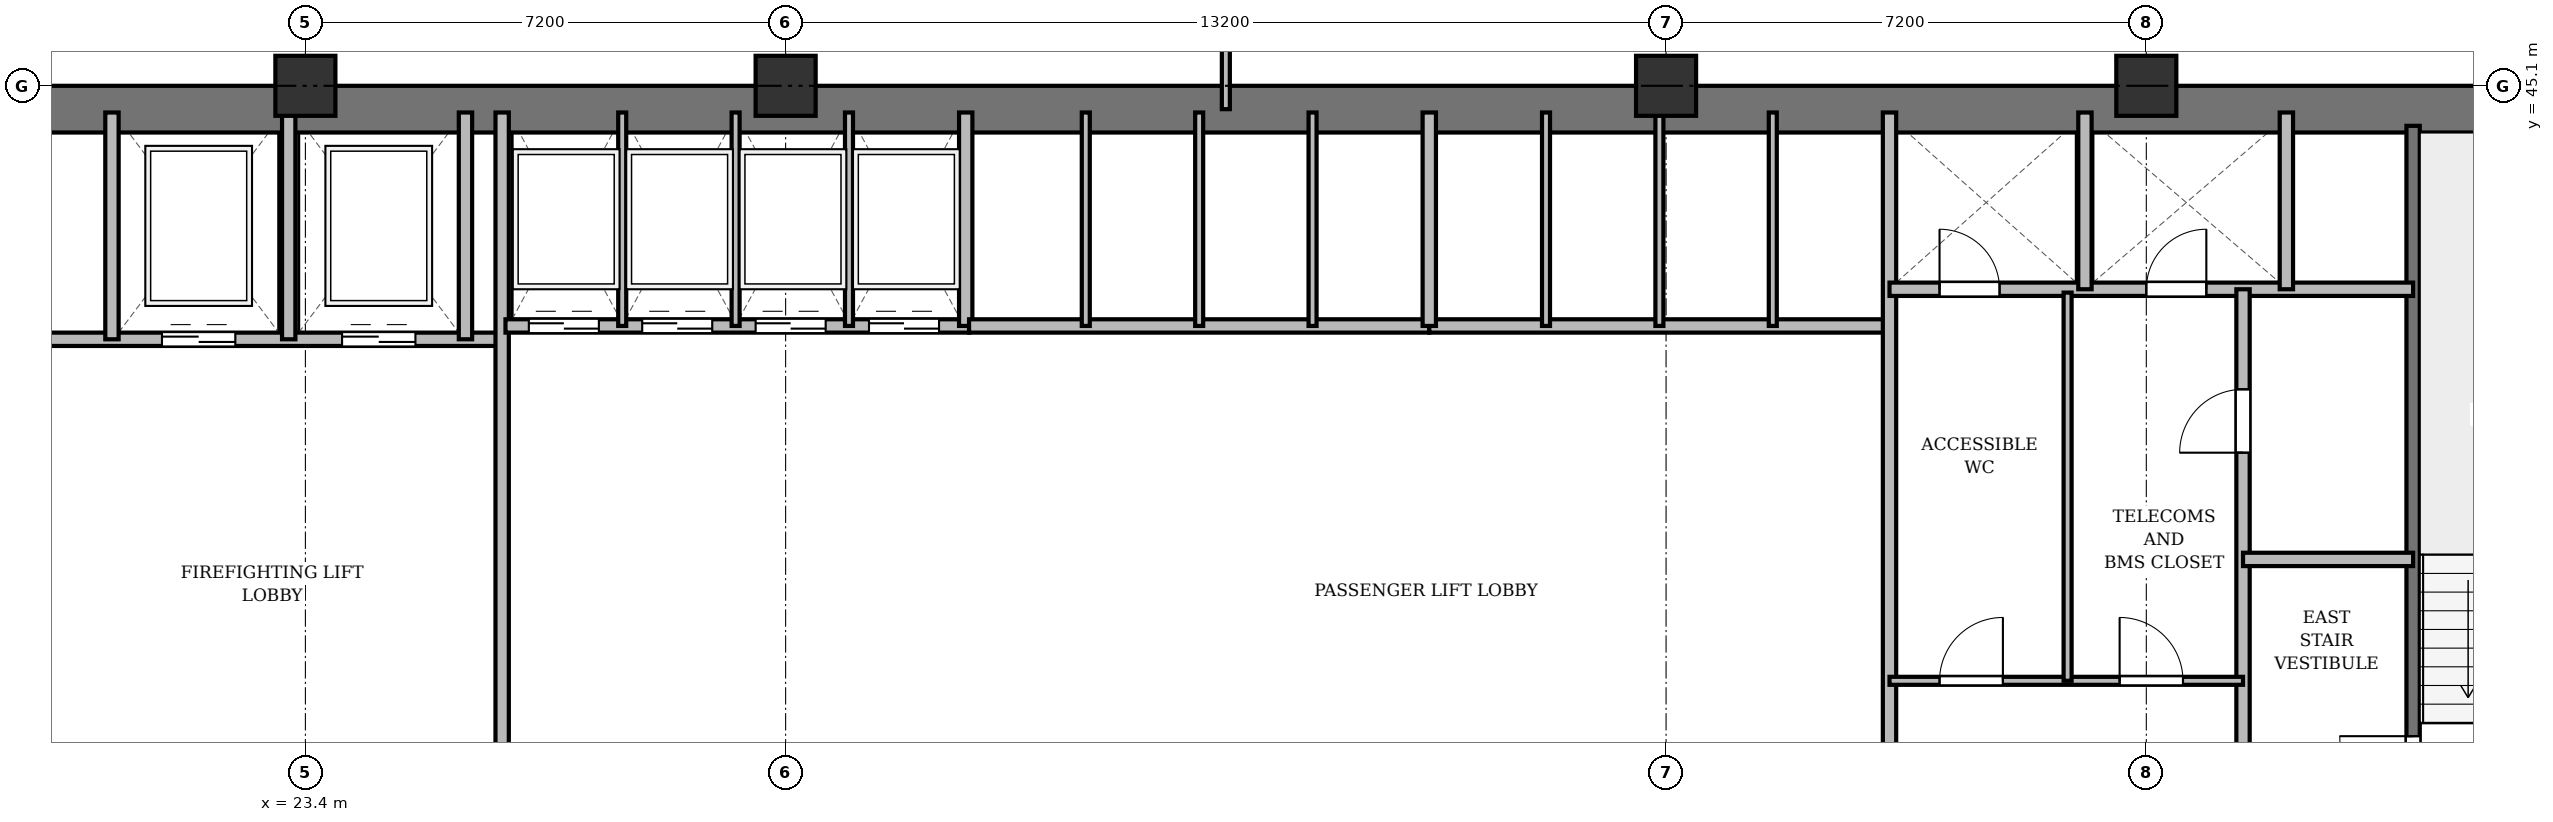
"""IFC4 building model, lengths in metres.
Left out: names, types, materials, properties, quantities, classifications, styles, units other than length and angle.
Written with IfcOpenShell. Run it as: python <this file> out.ifc"""

import sys

from ifc_helpers import new_model, si_unit, direction, frame, frame_2d, origin, origin_2d, place, context, subcontext, project, spatial, rectangle, extrude, source, transform, mapped, element, fill, save


model = new_model("IFC4")
c1 = context("Model", 3, precision=1e-05, world=origin(), true_north=direction((0.0, 1.0)))
c2 = subcontext(c1, "Body", "Model", "MODEL_VIEW")
j1 = project(units=[si_unit("LENGTHUNIT", "METRE"), si_unit("PLANEANGLEUNIT", "RADIAN")], contexts=[c1])
p1 = place(None, origin())
s1 = spatial("IfcSite", under=j1, at=p1, CompositionType="ELEMENT")
p2 = place(p1, origin())
s2 = spatial("IfcBuilding", under=s1, at=p2, CompositionType="ELEMENT")
p3 = place(p2, frame((0.0, 0.0, 48.7)))
s3 = spatial("IfcBuildingStorey", under=s2, at=p3, CompositionType="ELEMENT", Elevation=48.7)
m1 = source(origin(), c2, "Body", "SweptSolid", [
    extrude(rectangle(XDim=0.9, YDim=0.9, at=origin_2d()), origin(), (0.0, 0.0, 1.0), 3.6),
])
for number, where, z_axis, x_axis in (
    (1, (23.4, 45.1, 0.0), (0.0, 0.0, 1.0), (1.0, 0.0, 0.0)),
    (2, (30.6, 45.1, 0.0), (0.0, 0.0, 1.0), (1.0, 0.0, 0.0)),
    (3, (43.8, 45.1, 0.0), (0.0, 0.0, 1.0), (1.0, 0.0, 0.0)),
    (4, (51.0, 45.1, 0.0), (0.0, 0.0, 1.0), (1.0, 0.0, 0.0)),
):
    element("IfcColumn", number, at=place(p3, frame(where, z_axis=z_axis, x_axis=x_axis)), inside=s3, PredefinedType="COLUMN", context=c2, shape_type="MappedRepresentation", body=[
        mapped(m1, transform((0.0, 0.0, 0.0), x_axis=(1.0, 0.0, 0.0), y_axis=(0.0, 1.0, 0.0), z_axis=(0.0, 0.0, 1.0), scale=1.0)),
    ])
p4 = place(p3, frame((15.5, 44.75, 0.0), z_axis=(0.0, 0.0, 1.0), x_axis=(1.0, 0.0, 0.0)))
e5 = element("IfcWall", 5, at=p4, inside=s3, PredefinedType="SHEAR", context=c2, shape_type="SweptSolid", body=[
    extrude(rectangle(XDim=43.4, YDim=0.7, at=frame_2d((21.7, 0.0))), origin(), (0.0, 0.0, 1.0), 3.34),
])
p5 = place(p3, frame((55.0, 33.4, 0.0), z_axis=(0.0, 0.0, 1.0), x_axis=(0.0, 1.0, 0.0)))
e6 = element("IfcWall", 6, at=p5, inside=s3, PredefinedType="SHEAR", context=c2, shape_type="SweptSolid", body=[
    extrude(rectangle(XDim=11.1, YDim=0.2, at=frame_2d((5.55, 0.0))), origin(), (0.0, 0.0, 1.0), 3.34),
])
p6 = place(p5, frame((0.85, 0.0, 0.0)))
e7 = element("IfcOpeningElement", 7, at=p6, cuts=e6, PredefinedType="OPENING", context=c2, shape_type="SweptSolid", body=[
    extrude(rectangle(XDim=1.1, YDim=2.15, at=frame_2d((0.55, 1.075))), frame((0.0, 0.11, 0.0), z_axis=(0.0, -1.0, 0.0), x_axis=(1.0, 0.0, 0.0)), (0.0, 0.0, 1.0), 0.22),
])
p7 = place(p3, frame((19.55, 41.3, 0.0), z_axis=(0.0, 0.0, 1.0), x_axis=(1.0, 0.0, 0.0)))
e8 = element("IfcWall", 8, at=p7, inside=s3, PredefinedType="SOLIDWALL", context=c2, shape_type="SweptSolid", body=[
    extrude(rectangle(XDim=6.75, YDim=0.2, at=frame_2d((3.375, 0.0))), origin(), (0.0, 0.0, 1.0), 3.34),
])
p8 = place(p7, frame((1.7, 0.0, 0.0)))
e9 = element("IfcOpeningElement", 9, at=p8, cuts=e8, PredefinedType="OPENING", context=c2, shape_type="SweptSolid", body=[
    extrude(rectangle(XDim=1.1, YDim=2.15, at=frame_2d((0.55, 1.075))), frame((0.0, 0.11, 0.0), z_axis=(0.0, -1.0, 0.0), x_axis=(1.0, 0.0, 0.0)), (0.0, 0.0, 1.0), 0.22),
])
p9 = place(p7, frame((4.4, 0.0, 0.0)))
e10 = element("IfcOpeningElement", 10, at=p9, cuts=e8, PredefinedType="OPENING", context=c2, shape_type="SweptSolid", body=[
    extrude(rectangle(XDim=1.1, YDim=2.15, at=frame_2d((0.55, 1.075))), frame((0.0, 0.11, 0.0), z_axis=(0.0, -1.0, 0.0), x_axis=(1.0, 0.0, 0.0)), (0.0, 0.0, 1.0), 0.22),
])
for number, where, z_axis, x_axis in (
    (11, (20.5, 41.3, 0.0), (0.0, 0.0, 1.0), (0.0, 1.0, 0.0)),
    (12, (23.15, 41.3, 0.0), (0.0, 0.0, 1.0), (0.0, 1.0, 0.0)),
    (13, (25.8, 41.3, 0.0), (0.0, 0.0, 1.0), (0.0, 1.0, 0.0)),
):
    element("IfcWall", number, at=place(p3, frame(where, z_axis=z_axis, x_axis=x_axis)), inside=s3, PredefinedType="SOLIDWALL", context=c2, shape_type="SweptSolid", body=[
        extrude(rectangle(XDim=3.4, YDim=0.2, at=frame_2d((1.7, 0.0))), origin(), (0.0, 0.0, 1.0), 3.34),
    ])
p10 = place(p3, frame((26.35, 33.4, 0.0), z_axis=(0.0, 0.0, 1.0), x_axis=(0.0, 1.0, 0.0)))
e14 = element("IfcWall", 14, at=p10, inside=s3, PredefinedType="SOLIDWALL", context=c2, shape_type="SweptSolid", body=[
    extrude(rectangle(XDim=11.3, YDim=0.2, at=frame_2d((5.65, 0.0))), origin(), (0.0, 0.0, 1.0), 2.69),
])
p11 = place(p3, frame((26.4, 41.5, 0.0), z_axis=(0.0, 0.0, 1.0), x_axis=(1.0, 0.0, 0.0)))
e15 = element("IfcWall", 15, at=p11, inside=s3, PredefinedType="SOLIDWALL", context=c2, shape_type="SweptSolid", body=[
    extrude(rectangle(XDim=6.95, YDim=0.2, at=frame_2d((3.475, 0.0))), origin(), (0.0, 0.0, 1.0), 3.34),
])
p12 = place(p11, frame((0.35, 0.0, 0.0)))
e16 = element("IfcOpeningElement", 16, at=p12, cuts=e15, PredefinedType="OPENING", context=c2, shape_type="SweptSolid", body=[
    extrude(rectangle(XDim=1.05, YDim=2.15, at=frame_2d((0.525, 1.075))), frame((0.0, 0.11, 0.0), z_axis=(0.0, -1.0, 0.0), x_axis=(1.0, 0.0, 0.0)), (0.0, 0.0, 1.0), 0.22),
])
p13 = place(p11, frame((2.05, 0.0, 0.0)))
e17 = element("IfcOpeningElement", 17, at=p13, cuts=e15, PredefinedType="OPENING", context=c2, shape_type="SweptSolid", body=[
    extrude(rectangle(XDim=1.05, YDim=2.15, at=frame_2d((0.525, 1.075))), frame((0.0, 0.11, 0.0), z_axis=(0.0, -1.0, 0.0), x_axis=(1.0, 0.0, 0.0)), (0.0, 0.0, 1.0), 0.22),
])
p14 = place(p11, frame((3.75, 0.0, 0.0)))
e18 = element("IfcOpeningElement", 18, at=p14, cuts=e15, PredefinedType="OPENING", context=c2, shape_type="SweptSolid", body=[
    extrude(rectangle(XDim=1.05, YDim=2.15, at=frame_2d((0.525, 1.075))), frame((0.0, 0.11, 0.0), z_axis=(0.0, -1.0, 0.0), x_axis=(1.0, 0.0, 0.0)), (0.0, 0.0, 1.0), 0.22),
])
p15 = place(p11, frame((5.45, 0.0, 0.0)))
e19 = element("IfcOpeningElement", 19, at=p15, cuts=e15, PredefinedType="OPENING", context=c2, shape_type="SweptSolid", body=[
    extrude(rectangle(XDim=1.05, YDim=2.15, at=frame_2d((0.525, 1.075))), frame((0.0, 0.11, 0.0), z_axis=(0.0, -1.0, 0.0), x_axis=(1.0, 0.0, 0.0)), (0.0, 0.0, 1.0), 0.22),
])
p16 = place(p3, frame((33.3, 41.5, 0.0), z_axis=(0.0, 0.0, 1.0), x_axis=(0.0, 1.0, 0.0)))
e20 = element("IfcWall", 20, at=p16, inside=s3, PredefinedType="SOLIDWALL", context=c2, shape_type="SweptSolid", body=[
    extrude(rectangle(XDim=3.2, YDim=0.2, at=frame_2d((1.6, 0.0))), origin(), (0.0, 0.0, 1.0), 3.34),
])
for number, where, z_axis, x_axis in (
    (21, (28.15, 41.5, 0.0), (0.0, 0.0, 1.0), (0.0, 1.0, 0.0)),
    (22, (29.85, 41.5, 0.0), (0.0, 0.0, 1.0), (0.0, 1.0, 0.0)),
    (23, (31.55, 41.5, 0.0), (0.0, 0.0, 1.0), (0.0, 1.0, 0.0)),
):
    element("IfcWall", number, at=place(p3, frame(where, z_axis=z_axis, x_axis=x_axis)), inside=s3, PredefinedType="PARTITIONING", context=c2, shape_type="SweptSolid", body=[
        extrude(rectangle(XDim=3.2, YDim=0.12, at=frame_2d((1.6, 0.0))), origin(), (0.0, 0.0, 1.0), 3.34),
    ])
p17 = place(p3, frame((33.35, 41.5, 0.0), z_axis=(0.0, 0.0, 1.0), x_axis=(1.0, 0.0, 0.0)))
e24 = element("IfcWall", 24, at=p17, inside=s3, PredefinedType="SOLIDWALL", context=c2, shape_type="SweptSolid", body=[
    extrude(rectangle(XDim=6.9, YDim=0.2, at=frame_2d((3.45, 0.0))), origin(), (0.0, 0.0, 1.0), 3.34),
])
for number, where, z_axis, x_axis in (
    (25, (35.1, 41.5, 0.0), (0.0, 0.0, 1.0), (0.0, 1.0, 0.0)),
    (26, (36.8, 41.5, 0.0), (0.0, 0.0, 1.0), (0.0, 1.0, 0.0)),
    (27, (38.5, 41.5, 0.0), (0.0, 0.0, 1.0), (0.0, 1.0, 0.0)),
):
    element("IfcWall", number, at=place(p3, frame(where, z_axis=z_axis, x_axis=x_axis)), inside=s3, PredefinedType="PARTITIONING", context=c2, shape_type="SweptSolid", body=[
        extrude(rectangle(XDim=3.2, YDim=0.12, at=frame_2d((1.6, 0.0))), origin(), (0.0, 0.0, 1.0), 3.34),
    ])
p18 = place(p3, frame((40.25, 41.5, 0.0), z_axis=(0.0, 0.0, 1.0), x_axis=(1.0, 0.0, 0.0)))
e28 = element("IfcWall", 28, at=p18, inside=s3, PredefinedType="SOLIDWALL", context=c2, shape_type="SweptSolid", body=[
    extrude(rectangle(XDim=6.9, YDim=0.2, at=frame_2d((3.45, 0.0))), origin(), (0.0, 0.0, 1.0), 2.752),
])
p19 = place(p3, frame((40.25, 41.5, 0.0), z_axis=(0.0, 0.0, 1.0), x_axis=(0.0, 1.0, 0.0)))
e29 = element("IfcWall", 29, at=p19, inside=s3, PredefinedType="SOLIDWALL", context=c2, shape_type="SweptSolid", body=[
    extrude(rectangle(XDim=3.2, YDim=0.2, at=frame_2d((1.6, 0.0))), origin(), (0.0, 0.0, 1.0), 3.34),
])
p20 = place(p3, frame((42.0, 41.5, 0.0), z_axis=(0.0, 0.0, 1.0), x_axis=(0.0, 1.0, 0.0)))
e30 = element("IfcWall", 30, at=p20, inside=s3, PredefinedType="PARTITIONING", context=c2, shape_type="SweptSolid", body=[
    extrude(rectangle(XDim=3.2, YDim=0.12, at=frame_2d((1.6, 0.0))), origin(), (0.0, 0.0, 1.0), 3.34),
])
p21 = place(p3, frame((43.7, 41.5, 0.0), z_axis=(0.0, 0.0, 1.0), x_axis=(0.0, 1.0, 0.0)))
e31 = element("IfcWall", 31, at=p21, inside=s3, PredefinedType="PARTITIONING", context=c2, shape_type="SweptSolid", body=[
    extrude(rectangle(XDim=3.2, YDim=0.12, at=frame_2d((1.6, 0.0))), origin(), (0.0, 0.0, 1.0), 2.752),
])
p22 = place(p3, frame((45.4, 41.5, 0.0), z_axis=(0.0, 0.0, 1.0), x_axis=(0.0, 1.0, 0.0)))
e32 = element("IfcWall", 32, at=p22, inside=s3, PredefinedType="PARTITIONING", context=c2, shape_type="SweptSolid", body=[
    extrude(rectangle(XDim=3.2, YDim=0.12, at=frame_2d((1.6, 0.0))), origin(), (0.0, 0.0, 1.0), 3.34),
])
p23 = place(p3, frame((47.15, 33.4, 0.0), z_axis=(0.0, 0.0, 1.0), x_axis=(0.0, 1.0, 0.0)))
e33 = element("IfcWall", 33, at=p23, inside=s3, PredefinedType="SOLIDWALL", context=c2, shape_type="SweptSolid", body=[
    extrude(rectangle(XDim=11.3, YDim=0.2, at=frame_2d((5.65, 0.0))), origin(), (0.0, 0.0, 1.0), 2.69),
])
p24 = place(p3, frame((47.15, 42.05, 0.0), z_axis=(0.0, 0.0, 1.0), x_axis=(1.0, 0.0, 0.0)))
e34 = element("IfcWall", 34, at=p24, inside=s3, PredefinedType="SOLIDWALL", context=c2, shape_type="SweptSolid", body=[
    extrude(rectangle(XDim=7.85, YDim=0.2, at=frame_2d((3.925, 0.0))), origin(), (0.0, 0.0, 1.0), 2.752),
])
p25 = place(p24, frame((0.75, 0.0, 0.0)))
e35 = element("IfcOpeningElement", 35, at=p25, cuts=e34, PredefinedType="OPENING", context=c2, shape_type="SweptSolid", body=[
    extrude(rectangle(XDim=0.9, YDim=2.1, at=frame_2d((0.45, 1.05))), frame((0.0, 0.11, 0.0), z_axis=(0.0, -1.0, 0.0), x_axis=(1.0, 0.0, 0.0)), (0.0, 0.0, 1.0), 0.22),
])
p26 = place(p24, frame((3.85, 0.0, 0.0)))
e36 = element("IfcOpeningElement", 36, at=p26, cuts=e34, PredefinedType="OPENING", context=c2, shape_type="SweptSolid", body=[
    extrude(rectangle(XDim=0.9, YDim=2.1, at=frame_2d((0.45, 1.05))), frame((0.0, 0.11, 0.0), z_axis=(0.0, -1.0, 0.0), x_axis=(1.0, 0.0, 0.0)), (0.0, 0.0, 1.0), 0.22),
])
for number, where, z_axis, x_axis in (
    (37, (50.08, 42.05, 0.0), (0.0, 0.0, 1.0), (0.0, 1.0, 0.0)),
    (38, (53.1, 42.05, 0.0), (0.0, 0.0, 1.0), (0.0, 1.0, 0.0)),
):
    element("IfcWall", number, at=place(p3, frame(where, z_axis=z_axis, x_axis=x_axis)), inside=s3, PredefinedType="SOLIDWALL", context=c2, shape_type="SweptSolid", body=[
        extrude(rectangle(XDim=2.65, YDim=0.2, at=frame_2d((1.325, 0.0))), origin(), (0.0, 0.0, 1.0), 3.34),
    ])
p27 = place(p3, frame((52.45, 33.4, 0.0), z_axis=(0.0, 0.0, 1.0), x_axis=(0.0, 1.0, 0.0)))
e39 = element("IfcWall", 39, at=p27, inside=s3, PredefinedType="PARTITIONING", context=c2, shape_type="SweptSolid", body=[
    extrude(rectangle(XDim=8.65, YDim=0.2, at=frame_2d((4.325, 0.0))), origin(), (0.0, 0.0, 1.0), 2.69),
])
p28 = place(p27, frame((6.2, 0.0, 0.0)))
e40 = element("IfcOpeningElement", 40, at=p28, cuts=e39, PredefinedType="OPENING", context=c2, shape_type="SweptSolid", body=[
    extrude(rectangle(XDim=0.95, YDim=2.15, at=frame_2d((0.475, 1.075))), frame((0.0, 0.11, 0.0), z_axis=(0.0, -1.0, 0.0), x_axis=(1.0, 0.0, 0.0)), (0.0, 0.0, 1.0), 0.22),
])
p29 = place(p3, frame((52.45, 38.0, 0.0), z_axis=(0.0, 0.0, 1.0), x_axis=(1.0, 0.0, 0.0)))
e41 = element("IfcWall", 41, at=p29, inside=s3, PredefinedType="PARTITIONING", context=c2, shape_type="SweptSolid", body=[
    extrude(rectangle(XDim=2.55, YDim=0.2, at=frame_2d((1.275, 0.0))), origin(), (0.0, 0.0, 1.0), 3.34),
])
p30 = place(p3, frame((47.15, 36.18, 0.0), z_axis=(0.0, 0.0, 1.0), x_axis=(1.0, 0.0, 0.0)))
e42 = element("IfcWall", 42, at=p30, inside=s3, PredefinedType="PARTITIONING", context=c2, shape_type="SweptSolid", body=[
    extrude(rectangle(XDim=5.3, YDim=0.12, at=frame_2d((2.65, 0.0))), origin(), (0.0, 0.0, 1.0), 2.752),
])
p31 = place(p30, frame((0.75, 0.0, 0.0)))
e43 = element("IfcOpeningElement", 43, at=p31, cuts=e42, PredefinedType="OPENING", context=c2, shape_type="SweptSolid", body=[
    extrude(rectangle(XDim=0.95, YDim=2.15, at=frame_2d((0.475, 1.075))), frame((0.0, 0.07, 0.0), z_axis=(0.0, -1.0, 0.0), x_axis=(1.0, 0.0, 0.0)), (0.0, 0.0, 1.0), 0.14),
])
p32 = place(p30, frame((3.45, 0.0, 0.0)))
e44 = element("IfcOpeningElement", 44, at=p32, cuts=e42, PredefinedType="OPENING", context=c2, shape_type="SweptSolid", body=[
    extrude(rectangle(XDim=0.95, YDim=2.15, at=frame_2d((0.475, 1.075))), frame((0.0, 0.07, 0.0), z_axis=(0.0, -1.0, 0.0), x_axis=(1.0, 0.0, 0.0)), (0.0, 0.0, 1.0), 0.14),
])
p33 = place(p3, frame((49.82, 36.18, 0.0), z_axis=(0.0, 0.0, 1.0), x_axis=(0.0, 1.0, 0.0)))
e45 = element("IfcWall", 45, at=p33, inside=s3, PredefinedType="PARTITIONING", context=c2, shape_type="SweptSolid", body=[
    extrude(rectangle(XDim=5.82, YDim=0.12, at=frame_2d((2.91, 0.0))), origin(), (0.0, 0.0, 1.0), 3.34),
])
p34 = place(p3, frame((37.2, 44.75, 0.0), z_axis=(0.0, 0.0, 1.0), x_axis=(0.0, 1.0, 0.0)))
e46 = element("IfcWall", 46, at=p34, inside=s3, PredefinedType="PARTITIONING", context=c2, shape_type="SweptSolid", body=[
    extrude(rectangle(XDim=3.61, YDim=0.12, at=frame_2d((1.805, 0.0))), origin(), (0.0, 0.0, 1.0), 2.69),
])
p35 = place(p34, frame((1.1, 0.0, 0.0)))
e47 = element("IfcOpeningElement", 47, at=p35, cuts=e46, PredefinedType="OPENING", context=c2, shape_type="SweptSolid", body=[
    extrude(rectangle(XDim=0.95, YDim=2.15, at=frame_2d((0.475, 1.075))), frame((0.0, 0.07, 0.0), z_axis=(0.0, -1.0, 0.0), x_axis=(1.0, 0.0, 0.0)), (0.0, 0.0, 1.0), 0.14),
])
m2 = source(origin(), c2, "Body", "SweptSolid", [
    extrude(rectangle(XDim=1.1, YDim=2.15, at=frame_2d((0.55, 1.075))), frame((0.0, 0.025, 0.0), z_axis=(0.0, -1.0, 0.0), x_axis=(1.0, 0.0, 0.0)), (0.0, 0.0, 1.0), 0.05),
])
p36 = place(p6, origin())
e48 = element("IfcDoor", 48, at=p36, inside=s3, OperationType="SINGLE_SWING_RIGHT", PredefinedType="DOOR", context=c2, shape_type="MappedRepresentation", body=[
    mapped(m2, transform((0.0, 0.0, 0.0), x_axis=(1.0, 0.0, 0.0), y_axis=(0.0, 1.0, 0.0), z_axis=(0.0, 0.0, 1.0), scale=1.0)),
])
fill(e7, e48)
p37 = place(p8, origin())
e49 = element("IfcDoor", 49, at=p37, inside=s3, OperationType="DOUBLE_DOOR_SLIDING", PredefinedType="DOOR", context=c2, shape_type="MappedRepresentation", body=[
    mapped(m2, transform((0.0, 0.0, 0.0), x_axis=(1.0, 0.0, 0.0), y_axis=(0.0, 1.0, 0.0), z_axis=(0.0, 0.0, 1.0), scale=1.0)),
])
fill(e9, e49)
p38 = place(p9, origin())
e50 = element("IfcDoor", 50, at=p38, inside=s3, OperationType="DOUBLE_DOOR_SLIDING", PredefinedType="DOOR", context=c2, shape_type="MappedRepresentation", body=[
    mapped(m2, transform((0.0, 0.0, 0.0), x_axis=(1.0, 0.0, 0.0), y_axis=(0.0, 1.0, 0.0), z_axis=(0.0, 0.0, 1.0), scale=1.0)),
])
fill(e10, e50)
m3 = source(origin(), c2, "Body", "SweptSolid", [
    extrude(rectangle(XDim=1.05, YDim=2.15, at=frame_2d((0.525, 1.075))), frame((0.0, 0.025, 0.0), z_axis=(0.0, -1.0, 0.0), x_axis=(1.0, 0.0, 0.0)), (0.0, 0.0, 1.0), 0.05),
])
p39 = place(p12, origin())
e51 = element("IfcDoor", 51, at=p39, inside=s3, OperationType="DOUBLE_DOOR_SLIDING", PredefinedType="DOOR", context=c2, shape_type="MappedRepresentation", body=[
    mapped(m3, transform((0.0, 0.0, 0.0), x_axis=(1.0, 0.0, 0.0), y_axis=(0.0, 1.0, 0.0), z_axis=(0.0, 0.0, 1.0), scale=1.0)),
])
fill(e16, e51)
p40 = place(p13, origin())
e52 = element("IfcDoor", 52, at=p40, inside=s3, OperationType="DOUBLE_DOOR_SLIDING", PredefinedType="DOOR", context=c2, shape_type="MappedRepresentation", body=[
    mapped(m3, transform((0.0, 0.0, 0.0), x_axis=(1.0, 0.0, 0.0), y_axis=(0.0, 1.0, 0.0), z_axis=(0.0, 0.0, 1.0), scale=1.0)),
])
fill(e17, e52)
p41 = place(p14, origin())
e53 = element("IfcDoor", 53, at=p41, inside=s3, OperationType="DOUBLE_DOOR_SLIDING", PredefinedType="DOOR", context=c2, shape_type="MappedRepresentation", body=[
    mapped(m3, transform((0.0, 0.0, 0.0), x_axis=(1.0, 0.0, 0.0), y_axis=(0.0, 1.0, 0.0), z_axis=(0.0, 0.0, 1.0), scale=1.0)),
])
fill(e18, e53)
p42 = place(p15, origin())
e54 = element("IfcDoor", 54, at=p42, inside=s3, OperationType="DOUBLE_DOOR_SLIDING", PredefinedType="DOOR", context=c2, shape_type="MappedRepresentation", body=[
    mapped(m3, transform((0.0, 0.0, 0.0), x_axis=(1.0, 0.0, 0.0), y_axis=(0.0, 1.0, 0.0), z_axis=(0.0, 0.0, 1.0), scale=1.0)),
])
fill(e19, e54)
m4 = source(origin(), c2, "Body", "SweptSolid", [
    extrude(rectangle(XDim=0.9, YDim=2.1, at=frame_2d((0.45, 1.05))), frame((0.0, 0.025, 0.0), z_axis=(0.0, -1.0, 0.0), x_axis=(1.0, 0.0, 0.0)), (0.0, 0.0, 1.0), 0.05),
])
p43 = place(p25, origin())
e55 = element("IfcDoor", 55, at=p43, inside=s3, OperationType="SINGLE_SWING_LEFT", PredefinedType="DOOR", context=c2, shape_type="MappedRepresentation", body=[
    mapped(m4, transform((0.0, 0.0, 0.0), x_axis=(1.0, 0.0, 0.0), y_axis=(0.0, 1.0, 0.0), z_axis=(0.0, 0.0, 1.0), scale=1.0)),
])
fill(e35, e55)
p44 = place(p26, origin())
e56 = element("IfcDoor", 56, at=p44, inside=s3, OperationType="SINGLE_SWING_RIGHT", PredefinedType="DOOR", context=c2, shape_type="MappedRepresentation", body=[
    mapped(m4, transform((0.0, 0.0, 0.0), x_axis=(1.0, 0.0, 0.0), y_axis=(0.0, 1.0, 0.0), z_axis=(0.0, 0.0, 1.0), scale=1.0)),
])
fill(e36, e56)
m5 = source(origin(), c2, "Body", "SweptSolid", [
    extrude(rectangle(XDim=0.95, YDim=2.15, at=frame_2d((0.475, 1.075))), frame((0.0, 0.025, 0.0), z_axis=(0.0, -1.0, 0.0), x_axis=(1.0, 0.0, 0.0)), (0.0, 0.0, 1.0), 0.05),
])
p45 = place(p28, origin())
e57 = element("IfcDoor", 57, at=p45, inside=s3, OperationType="SINGLE_SWING_LEFT", PredefinedType="DOOR", context=c2, shape_type="MappedRepresentation", body=[
    mapped(m5, transform((0.0, 0.0, 0.0), x_axis=(1.0, 0.0, 0.0), y_axis=(0.0, 1.0, 0.0), z_axis=(0.0, 0.0, 1.0), scale=1.0)),
])
fill(e40, e57)
p46 = place(p31, origin())
e58 = element("IfcDoor", 58, at=p46, inside=s3, OperationType="SINGLE_SWING_RIGHT", PredefinedType="DOOR", context=c2, shape_type="MappedRepresentation", body=[
    mapped(m5, transform((0.0, 0.0, 0.0), x_axis=(1.0, 0.0, 0.0), y_axis=(0.0, 1.0, 0.0), z_axis=(0.0, 0.0, 1.0), scale=1.0)),
])
fill(e43, e58)
p47 = place(p32, origin())
e59 = element("IfcDoor", 59, at=p47, inside=s3, OperationType="SINGLE_SWING_LEFT", PredefinedType="DOOR", context=c2, shape_type="MappedRepresentation", body=[
    mapped(m5, transform((0.0, 0.0, 0.0), x_axis=(1.0, 0.0, 0.0), y_axis=(0.0, 1.0, 0.0), z_axis=(0.0, 0.0, 1.0), scale=1.0)),
])
fill(e44, e59)
save(model, sys.argv[1])
